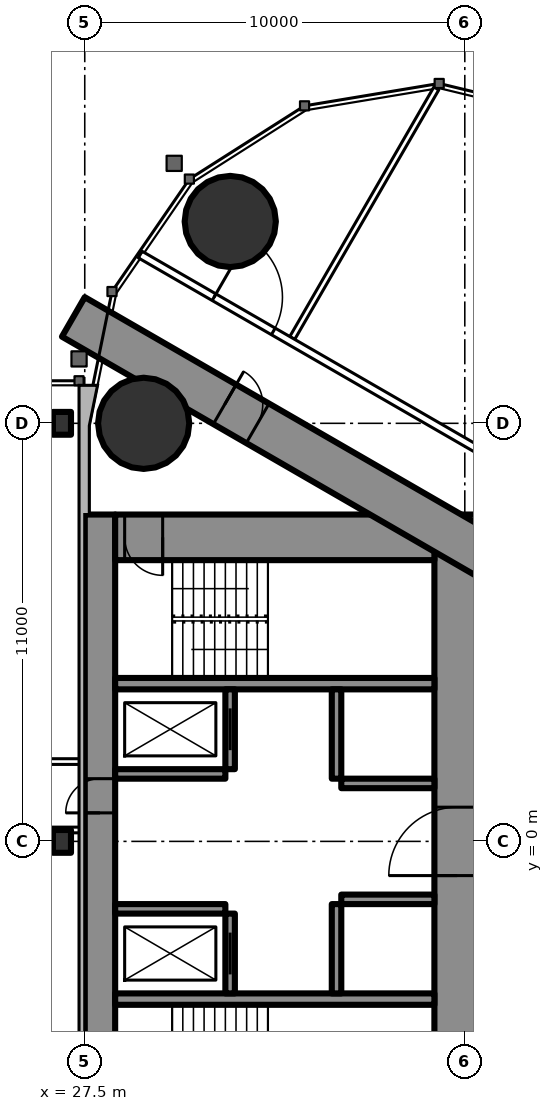
"""IFC4 building model, lengths in metres.
Left out: names, types, materials, properties, quantities, classifications, styles, units other than length and angle.
Written with IfcOpenShell. Run it as: python <this file> out.ifc"""

import sys

from ifc_helpers import new_model, si_unit, direction, frame, frame_2d, origin, origin_2d, place, context, subcontext, project, spatial, rectangle, circle, i_section, extrude, element, fill, save


model = new_model("IFC4")
c1 = context("Model", 3, precision=1e-05, world=origin(), true_north=direction((0.0, 1.0)))
c2 = subcontext(c1, "Body", "Model", "MODEL_VIEW")
j1 = project(units=[si_unit("LENGTHUNIT", "METRE"), si_unit("PLANEANGLEUNIT", "RADIAN")], contexts=[c1])
p1 = place(None, origin())
s1 = spatial("IfcSite", under=j1, at=p1, CompositionType="ELEMENT")
p2 = place(p1, origin())
s2 = spatial("IfcBuilding", under=s1, at=p2, CompositionType="ELEMENT")
p3 = place(p2, frame((0.0, 0.0, 229.7)))
s3 = spatial("IfcBuildingStorey", under=s2, at=p3, CompositionType="ELEMENT", Elevation=229.7)
for number, where, z_axis, x_axis in (
    (1, (31.328, 16.311, 0.0), (0.0, 0.0, 1.0), (1.0, 0.0, 0.0)),
    (2, (29.05, 11.0, 0.0), (0.0, 0.0, 1.0), (1.0, 0.0, 0.0)),
):
    element("IfcColumn", number, at=place(p3, frame(where, z_axis=z_axis, x_axis=x_axis)), inside=s3, PredefinedType="COLUMN", context=c2, shape_type="SweptSolid", body=[
        extrude(circle(Radius=1.2, at=origin_2d()), origin(), (0.0, 0.0, 1.0), 3.6),
    ])
p4 = place(p3, frame((27.9, -8.6, 0.0), z_axis=(0.0, 0.0, 1.0), x_axis=(0.0, 1.0, 0.0)))
e3 = element("IfcWall", 3, at=p4, inside=s3, PredefinedType="SHEAR", context=c2, shape_type="SweptSolid", body=[
    extrude(rectangle(XDim=17.2, YDim=0.8, at=frame_2d((8.6, 0.0))), origin(), (0.0, 0.0, 1.0), 3.6),
])
p5 = place(p4, frame((9.35, 0.0, 0.0)))
e4 = element("IfcOpeningElement", 4, at=p5, cuts=e3, PredefinedType="OPENING", context=c2, shape_type="SweptSolid", body=[
    extrude(rectangle(XDim=0.9, YDim=2.2, at=frame_2d((0.45, 1.1))), frame((0.0, 0.41, 0.0), z_axis=(0.0, -1.0, 0.0), x_axis=(1.0, 0.0, 0.0)), (0.0, 0.0, 1.0), 0.82),
])
p6 = place(p3, frame((37.3, -8.6, 0.0), z_axis=(0.0, 0.0, 1.0), x_axis=(0.0, 1.0, 0.0)))
e5 = element("IfcWall", 5, at=p6, inside=s3, PredefinedType="SHEAR", context=c2, shape_type="SweptSolid", body=[
    extrude(rectangle(XDim=17.2, YDim=1.2, at=frame_2d((8.6, 0.0))), origin(), (0.0, 0.0, 1.0), 3.6),
])
p7 = place(p6, frame((7.7, 0.0, 0.0)))
e6 = element("IfcOpeningElement", 6, at=p7, cuts=e5, PredefinedType="OPENING", context=c2, shape_type="SweptSolid", body=[
    extrude(rectangle(XDim=1.8, YDim=2.2, at=frame_2d((0.9, 1.1))), frame((0.0, 0.61, 0.0), z_axis=(0.0, -1.0, 0.0), x_axis=(1.0, 0.0, 0.0)), (0.0, 0.0, 1.0), 1.22),
])
p8 = place(p3, frame((28.3, 8.0, 0.0), z_axis=(0.0, 0.0, 1.0), x_axis=(1.0, 0.0, 0.0)))
e7 = element("IfcWall", 7, at=p8, inside=s3, PredefinedType="SHEAR", context=c2, shape_type="SweptSolid", body=[
    extrude(rectangle(XDim=8.4, YDim=1.2, at=frame_2d((4.2, 0.0))), origin(), (0.0, 0.0, 1.0), 3.6),
])
p9 = place(p8, frame((0.25, 0.0, 0.0)))
e8 = element("IfcOpeningElement", 8, at=p9, cuts=e7, PredefinedType="OPENING", context=c2, shape_type="SweptSolid", body=[
    extrude(rectangle(XDim=1.0, YDim=2.2, at=frame_2d((0.5, 1.1))), frame((0.0, 0.61, 0.0), z_axis=(0.0, -1.0, 0.0), x_axis=(1.0, 0.0, 0.0)), (0.0, 0.0, 1.0), 1.22),
])
for number, where, z_axis, x_axis in (
    (9, (28.3, -4.15, 0.0), (0.0, 0.0, 1.0), (1.0, 0.0, 0.0)),
    (10, (28.3, 4.15, 0.0), (0.0, 0.0, 1.0), (1.0, 0.0, 0.0)),
):
    element("IfcWall", number, at=place(p3, frame(where, z_axis=z_axis, x_axis=x_axis)), inside=s3, PredefinedType="SHEAR", context=c2, shape_type="SweptSolid", body=[
        extrude(rectangle(XDim=8.4, YDim=0.3, at=frame_2d((4.2, 0.0))), origin(), (0.0, 0.0, 1.0), 3.6),
    ])
p10 = place(p3, frame((31.325, -4.0, 0.0), z_axis=(0.0, 0.0, 1.0), x_axis=(0.0, 1.0, 0.0)))
e11 = element("IfcWall", 11, at=p10, inside=s3, PredefinedType="SHEAR", context=c2, shape_type="SweptSolid", body=[
    extrude(rectangle(XDim=2.1, YDim=0.25, at=frame_2d((1.05, 0.0))), origin(), (0.0, 0.0, 1.0), 3.6),
])
p11 = place(p10, frame((0.5, 0.0, 0.0)))
e12 = element("IfcOpeningElement", 12, at=p11, cuts=e11, PredefinedType="OPENING", context=c2, shape_type="SweptSolid", body=[
    extrude(rectangle(XDim=1.1, YDim=2.2, at=frame_2d((0.55, 1.1))), frame((0.0, 0.135, 0.0), z_axis=(0.0, -1.0, 0.0), x_axis=(1.0, 0.0, 0.0)), (0.0, 0.0, 1.0), 0.27),
])
p12 = place(p3, frame((34.125, -4.0, 0.0), z_axis=(0.0, 0.0, 1.0), x_axis=(0.0, 1.0, 0.0)))
e13 = element("IfcWall", 13, at=p12, inside=s3, PredefinedType="SHEAR", context=c2, shape_type="SweptSolid", body=[
    extrude(rectangle(XDim=2.35, YDim=0.25, at=frame_2d((1.175, 0.0))), origin(), (0.0, 0.0, 1.0), 3.6),
])
p13 = place(p3, frame((28.3, -1.775, 0.0), z_axis=(0.0, 0.0, 1.0), x_axis=(1.0, 0.0, 0.0)))
e14 = element("IfcWall", 14, at=p13, inside=s3, PredefinedType="SHEAR", context=c2, shape_type="SweptSolid", body=[
    extrude(rectangle(XDim=2.9, YDim=0.25, at=frame_2d((1.45, 0.0))), origin(), (0.0, 0.0, 1.0), 3.6),
])
p14 = place(p3, frame((34.25, -1.525, 0.0), z_axis=(0.0, 0.0, 1.0), x_axis=(1.0, 0.0, 0.0)))
e15 = element("IfcWall", 15, at=p14, inside=s3, PredefinedType="SHEAR", context=c2, shape_type="SweptSolid", body=[
    extrude(rectangle(XDim=2.45, YDim=0.25, at=frame_2d((1.225, 0.0))), origin(), (0.0, 0.0, 1.0), 3.6),
])
p15 = place(p3, frame((31.325, 1.9, 0.0), z_axis=(0.0, 0.0, 1.0), x_axis=(0.0, 1.0, 0.0)))
e16 = element("IfcWall", 16, at=p15, inside=s3, PredefinedType="SHEAR", context=c2, shape_type="SweptSolid", body=[
    extrude(rectangle(XDim=2.1, YDim=0.25, at=frame_2d((1.05, 0.0))), origin(), (0.0, 0.0, 1.0), 3.6),
])
p16 = place(p15, frame((0.5, 0.0, 0.0)))
e17 = element("IfcOpeningElement", 17, at=p16, cuts=e16, PredefinedType="OPENING", context=c2, shape_type="SweptSolid", body=[
    extrude(rectangle(XDim=1.1, YDim=2.2, at=frame_2d((0.55, 1.1))), frame((0.0, 0.135, 0.0), z_axis=(0.0, -1.0, 0.0), x_axis=(1.0, 0.0, 0.0)), (0.0, 0.0, 1.0), 0.27),
])
p17 = place(p3, frame((34.125, 1.65, 0.0), z_axis=(0.0, 0.0, 1.0), x_axis=(0.0, 1.0, 0.0)))
e18 = element("IfcWall", 18, at=p17, inside=s3, PredefinedType="SHEAR", context=c2, shape_type="SweptSolid", body=[
    extrude(rectangle(XDim=2.35, YDim=0.25, at=frame_2d((1.175, 0.0))), origin(), (0.0, 0.0, 1.0), 3.6),
])
p18 = place(p3, frame((28.3, 1.775, 0.0), z_axis=(0.0, 0.0, 1.0), x_axis=(1.0, 0.0, 0.0)))
e19 = element("IfcWall", 19, at=p18, inside=s3, PredefinedType="SHEAR", context=c2, shape_type="SweptSolid", body=[
    extrude(rectangle(XDim=2.9, YDim=0.25, at=frame_2d((1.45, 0.0))), origin(), (0.0, 0.0, 1.0), 3.6),
])
p19 = place(p3, frame((34.25, 1.525, 0.0), z_axis=(0.0, 0.0, 1.0), x_axis=(1.0, 0.0, 0.0)))
e20 = element("IfcWall", 20, at=p19, inside=s3, PredefinedType="SHEAR", context=c2, shape_type="SweptSolid", body=[
    extrude(rectangle(XDim=2.45, YDim=0.25, at=frame_2d((1.225, 0.0))), origin(), (0.0, 0.0, 1.0), 3.6),
])
p20 = place(p3, frame((27.2, -13.8, 0.0), z_axis=(0.0, 0.0, 1.0), x_axis=(0.866027159892, 0.499996958321, 0.0)))
e21 = element("IfcWall", 21, at=p20, inside=s3, PredefinedType="SHEAR", context=c2, shape_type="SweptSolid", body=[
    extrude(rectangle(XDim=27.947, YDim=1.2, at=frame_2d((13.973, 0.0))), origin(), (0.0, 0.0, 1.0), 3.6),
])
p21 = place(p20, frame((4.6, 0.0, 0.0)))
e22 = element("IfcOpeningElement", 22, at=p21, cuts=e21, PredefinedType="OPENING", context=c2, shape_type="SweptSolid", body=[
    extrude(rectangle(XDim=1.0, YDim=2.2, at=frame_2d((0.5, 1.1))), frame((0.0, 0.61, 0.0), z_axis=(0.0, -1.0, 0.0), x_axis=(1.0, 0.0, 0.0)), (0.0, 0.0, 1.0), 1.22),
])
p22 = place(p20, frame((13.395, 0.0, 0.0)))
e23 = element("IfcOpeningElement", 23, at=p22, cuts=e21, PredefinedType="OPENING", context=c2, shape_type="SweptSolid", body=[
    extrude(rectangle(XDim=1.8, YDim=2.2, at=frame_2d((0.9, 1.1))), frame((0.0, 0.61, 0.0), z_axis=(0.0, -1.0, 0.0), x_axis=(1.0, 0.0, 0.0)), (0.0, 0.0, 1.0), 1.22),
])
p23 = place(p3, frame((27.2, 13.8, 0.0), z_axis=(0.0, 0.0, 1.0), x_axis=(0.866024515034, -0.500001539357, 0.0)))
e24 = element("IfcWall", 24, at=p23, inside=s3, PredefinedType="SHEAR", context=c2, shape_type="SweptSolid", body=[
    extrude(rectangle(XDim=26.907, YDim=1.2, at=frame_2d((13.454, 0.0))), origin(), (0.0, 0.0, 1.0), 3.6),
])
p24 = place(p23, frame((4.6, 0.0, 0.0)))
e25 = element("IfcOpeningElement", 25, at=p24, cuts=e24, PredefinedType="OPENING", context=c2, shape_type="SweptSolid", body=[
    extrude(rectangle(XDim=1.0, YDim=2.2, at=frame_2d((0.5, 1.1))), frame((0.0, 0.61, 0.0), z_axis=(0.0, -1.0, 0.0), x_axis=(1.0, 0.0, 0.0)), (0.0, 0.0, 1.0), 1.22),
])
p25 = place(p23, frame((13.395, 0.0, 0.0)))
e26 = element("IfcOpeningElement", 26, at=p25, cuts=e24, PredefinedType="OPENING", context=c2, shape_type="SweptSolid", body=[
    extrude(rectangle(XDim=1.8, YDim=2.2, at=frame_2d((0.9, 1.1))), frame((0.0, 0.61, 0.0), z_axis=(0.0, -1.0, 0.0), x_axis=(1.0, 0.0, 0.0)), (0.0, 0.0, 1.0), 1.22),
])
for number, where, z_axis, x_axis in (
    (27, (26.9, 0.0, 0.0), (0.0, 0.0, 1.0), (1.0, 0.0, 0.0)),
    (28, (26.9, 11.0, 0.0), (0.0, 0.0, 1.0), (1.0, 0.0, 0.0)),
):
    element("IfcColumn", number, at=place(p3, frame(where, z_axis=z_axis, x_axis=x_axis)), inside=s3, PredefinedType="COLUMN", context=c2, shape_type="SweptSolid", body=[
        extrude(i_section(OverallWidth=0.476, OverallDepth=0.6, WebThickness=0.1, FlangeThickness=0.14, FilletRadius=0.02, at=origin_2d()), origin(), (0.0, 0.0, 1.0), 3.6),
    ])
p26 = place(p3, frame((32.96, 13.246, 0.0), z_axis=(0.0, 0.0, 1.0), x_axis=(0.500000236886, 0.866025267018, 0.0)))
e29 = element("IfcWall", 29, at=p26, inside=s3, PredefinedType="PARTITIONING", context=c2, shape_type="SweptSolid", body=[
    extrude(rectangle(XDim=7.583, YDim=0.15, at=frame_2d((3.791, 0.0))), origin(), (0.0, 0.0, 1.0), 3.35),
])
p27 = place(p3, frame((28.959, 15.44, 0.0), z_axis=(0.0, 0.0, 1.0), x_axis=(0.866028936079, -0.499993881836, 0.0)))
e30 = element("IfcWall", 30, at=p27, inside=s3, PredefinedType="PARTITIONING", context=c2, shape_type="SweptSolid", body=[
    extrude(rectangle(XDim=20.503, YDim=0.2, at=frame_2d((10.251, 0.0))), origin(), (0.0, 0.0, 1.0), 3.35),
])
p28 = place(p27, frame((16.137, 0.0, 0.0)))
e31 = element("IfcOpeningElement", 31, at=p28, cuts=e30, PredefinedType="OPENING", context=c2, shape_type="SweptSolid", body=[
    extrude(rectangle(XDim=0.95, YDim=2.2, at=frame_2d((0.475, 1.1))), frame((0.0, 0.11, 0.0), z_axis=(0.0, -1.0, 0.0), x_axis=(1.0, 0.0, 0.0)), (0.0, 0.0, 1.0), 0.22),
])
p29 = place(p27, frame((14.437, 0.0, 0.0)))
e32 = element("IfcOpeningElement", 32, at=p29, cuts=e30, PredefinedType="OPENING", context=c2, shape_type="SweptSolid", body=[
    extrude(rectangle(XDim=0.95, YDim=2.2, at=frame_2d((0.475, 1.1))), frame((0.0, 0.11, 0.0), z_axis=(0.0, -1.0, 0.0), x_axis=(1.0, 0.0, 0.0)), (0.0, 0.0, 1.0), 0.22),
])
p30 = place(p27, frame((2.244, 0.0, 0.0)))
e33 = element("IfcOpeningElement", 33, at=p30, cuts=e30, PredefinedType="OPENING", context=c2, shape_type="SweptSolid", body=[
    extrude(rectangle(XDim=1.8, YDim=2.04, at=frame_2d((0.9, 1.02))), frame((0.0, 0.11, 0.0), z_axis=(0.0, -1.0, 0.0), x_axis=(1.0, 0.0, 0.0)), (0.0, 0.0, 1.0), 0.22),
])
p31 = place(p3, frame((-27.5, 0.3, 0.0), z_axis=(0.0, 0.0, 1.0), x_axis=(1.0, 0.0, 0.0)))
e34 = element("IfcWall", 34, at=p31, inside=s3, PredefinedType="PARTITIONING", context=c2, shape_type="SweptSolid", body=[
    extrude(rectangle(XDim=55.0, YDim=0.15, at=frame_2d((27.5, 0.0))), origin(), (0.0, 0.0, 1.0), 2.4),
])
p32 = place(p31, frame((1.575, 0.0, 0.0)))
e35 = element("IfcOpeningElement", 35, at=p32, cuts=e34, PredefinedType="OPENING", context=c2, shape_type="SweptSolid", body=[
    extrude(rectangle(XDim=1.0, YDim=2.2, at=frame_2d((0.5, 1.1))), frame((0.0, 0.085, 0.0), z_axis=(0.0, -1.0, 0.0), x_axis=(1.0, 0.0, 0.0)), (0.0, 0.0, 1.0), 0.17),
])
p33 = place(p31, frame((7.525, 0.0, 0.0)))
e36 = element("IfcOpeningElement", 36, at=p33, cuts=e34, PredefinedType="OPENING", context=c2, shape_type="SweptSolid", body=[
    extrude(rectangle(XDim=1.05, YDim=2.4, at=frame_2d((0.525, 1.2))), frame((0.0, 0.085, 0.0), z_axis=(0.0, -1.0, 0.0), x_axis=(1.0, 0.0, 0.0)), (0.0, 0.0, 1.0), 0.17),
])
p34 = place(p31, frame((18.525, 0.0, 0.0)))
e37 = element("IfcOpeningElement", 37, at=p34, cuts=e34, PredefinedType="OPENING", context=c2, shape_type="SweptSolid", body=[
    extrude(rectangle(XDim=1.05, YDim=2.4, at=frame_2d((0.525, 1.2))), frame((0.0, 0.085, 0.0), z_axis=(0.0, -1.0, 0.0), x_axis=(1.0, 0.0, 0.0)), (0.0, 0.0, 1.0), 0.17),
])
p35 = place(p31, frame((24.025, 0.0, 0.0)))
e38 = element("IfcOpeningElement", 38, at=p35, cuts=e34, PredefinedType="OPENING", context=c2, shape_type="SweptSolid", body=[
    extrude(rectangle(XDim=1.05, YDim=2.4, at=frame_2d((0.525, 1.2))), frame((0.0, 0.085, 0.0), z_axis=(0.0, -1.0, 0.0), x_axis=(1.0, 0.0, 0.0)), (0.0, 0.0, 1.0), 0.17),
])
p36 = place(p31, frame((35.025, 0.0, 0.0)))
e39 = element("IfcOpeningElement", 39, at=p36, cuts=e34, PredefinedType="OPENING", context=c2, shape_type="SweptSolid", body=[
    extrude(rectangle(XDim=1.05, YDim=2.4, at=frame_2d((0.525, 1.2))), frame((0.0, 0.085, 0.0), z_axis=(0.0, -1.0, 0.0), x_axis=(1.0, 0.0, 0.0)), (0.0, 0.0, 1.0), 0.17),
])
p37 = place(p31, frame((40.525, 0.0, 0.0)))
e40 = element("IfcOpeningElement", 40, at=p37, cuts=e34, PredefinedType="OPENING", context=c2, shape_type="SweptSolid", body=[
    extrude(rectangle(XDim=1.05, YDim=2.4, at=frame_2d((0.525, 1.2))), frame((0.0, 0.085, 0.0), z_axis=(0.0, -1.0, 0.0), x_axis=(1.0, 0.0, 0.0)), (0.0, 0.0, 1.0), 0.17),
])
p38 = place(p31, frame((52.525, 0.0, 0.0)))
e41 = element("IfcOpeningElement", 41, at=p38, cuts=e34, PredefinedType="OPENING", context=c2, shape_type="SweptSolid", body=[
    extrude(rectangle(XDim=1.05, YDim=2.4, at=frame_2d((0.525, 1.2))), frame((0.0, 0.085, 0.0), z_axis=(0.0, -1.0, 0.0), x_axis=(1.0, 0.0, 0.0)), (0.0, 0.0, 1.0), 0.17),
])
p39 = place(p3, frame((5.85, 2.1, 0.0), z_axis=(0.0, 0.0, 1.0), x_axis=(1.0, 0.0, 0.0)))
e42 = element("IfcWall", 42, at=p39, inside=s3, PredefinedType="PARTITIONING", context=c2, shape_type="SweptSolid", body=[
    extrude(rectangle(XDim=21.65, YDim=0.15, at=frame_2d((10.825, 0.0))), origin(), (0.0, 0.0, 1.0), 3.4),
])
p40 = place(p39, frame((1.675, 0.0, 0.0)))
e43 = element("IfcOpeningElement", 43, at=p40, cuts=e42, PredefinedType="OPENING", context=c2, shape_type="SweptSolid", body=[
    extrude(rectangle(XDim=1.05, YDim=2.4, at=frame_2d((0.525, 1.2))), frame((0.0, 0.085, 0.0), z_axis=(0.0, -1.0, 0.0), x_axis=(1.0, 0.0, 0.0)), (0.0, 0.0, 1.0), 0.17),
])
p41 = place(p39, frame((7.175, 0.0, 0.0)))
e44 = element("IfcOpeningElement", 44, at=p41, cuts=e42, PredefinedType="OPENING", context=c2, shape_type="SweptSolid", body=[
    extrude(rectangle(XDim=1.05, YDim=2.4, at=frame_2d((0.525, 1.2))), frame((0.0, 0.085, 0.0), z_axis=(0.0, -1.0, 0.0), x_axis=(1.0, 0.0, 0.0)), (0.0, 0.0, 1.0), 0.17),
])
p42 = place(p39, frame((19.175, 0.0, 0.0)))
e45 = element("IfcOpeningElement", 45, at=p42, cuts=e42, PredefinedType="OPENING", context=c2, shape_type="SweptSolid", body=[
    extrude(rectangle(XDim=1.05, YDim=2.4, at=frame_2d((0.525, 1.2))), frame((0.0, 0.085, 0.0), z_axis=(0.0, -1.0, 0.0), x_axis=(1.0, 0.0, 0.0)), (0.0, 0.0, 1.0), 0.17),
])
p43 = place(p30, origin())
e46 = element("IfcDoor", 46, at=p43, inside=s3, OperationType="DOUBLE_DOOR_SINGLE_SWING", PredefinedType="DOOR", context=c2, shape_type="SweptSolid", body=[
    extrude(rectangle(XDim=1.8, YDim=2.04, at=frame_2d((0.9, 1.02))), frame((0.0, 0.025, 0.0), z_axis=(0.0, -1.0, 0.0), x_axis=(1.0, 0.0, 0.0)), (0.0, 0.0, 1.0), 0.05),
])
fill(e33, e46)
p44 = place(p24, origin())
e47 = element("IfcDoor", 47, at=p44, inside=s3, OperationType="SINGLE_SWING_LEFT", PredefinedType="DOOR", context=c2, shape_type="SweptSolid", body=[
    extrude(rectangle(XDim=1.0, YDim=2.2, at=frame_2d((0.5, 1.1))), frame((0.0, 0.025, 0.0), z_axis=(0.0, -1.0, 0.0), x_axis=(1.0, 0.0, 0.0)), (0.0, 0.0, 1.0), 0.05),
])
fill(e25, e47)
p45 = place(p7, origin())
e48 = element("IfcDoor", 48, at=p45, inside=s3, OperationType="DOUBLE_DOOR_SINGLE_SWING", PredefinedType="DOOR", context=c2, shape_type="SweptSolid", body=[
    extrude(rectangle(XDim=1.8, YDim=2.2, at=frame_2d((0.9, 1.1))), frame((0.0, 0.025, 0.0), z_axis=(0.0, -1.0, 0.0), x_axis=(1.0, 0.0, 0.0)), (0.0, 0.0, 1.0), 0.05),
])
fill(e6, e48)
p46 = place(p9, origin())
e49 = element("IfcDoor", 49, at=p46, inside=s3, OperationType="SINGLE_SWING_RIGHT", PredefinedType="DOOR", context=c2, shape_type="SweptSolid", body=[
    extrude(rectangle(XDim=1.0, YDim=2.2, at=frame_2d((0.5, 1.1))), frame((0.0, 0.025, 0.0), z_axis=(0.0, -1.0, 0.0), x_axis=(1.0, 0.0, 0.0)), (0.0, 0.0, 1.0), 0.05),
])
fill(e8, e49)
p47 = place(p5, origin())
e50 = element("IfcDoor", 50, at=p47, inside=s3, OperationType="SINGLE_SWING_LEFT", PredefinedType="DOOR", context=c2, shape_type="SweptSolid", body=[
    extrude(rectangle(XDim=0.9, YDim=2.2, at=frame_2d((0.45, 1.1))), frame((0.0, 0.025, 0.0), z_axis=(0.0, -1.0, 0.0), x_axis=(1.0, 0.0, 0.0)), (0.0, 0.0, 1.0), 0.05),
])
fill(e4, e50)
p48 = place(p11, origin())
e51 = element("IfcDoor", 51, at=p48, inside=s3, OperationType="SLIDING_TO_LEFT", PredefinedType="USERDEFINED", context=c2, shape_type="SweptSolid", body=[
    extrude(rectangle(XDim=1.1, YDim=2.2, at=frame_2d((0.55, 1.1))), frame((0.0, 0.025, 0.0), z_axis=(0.0, -1.0, 0.0), x_axis=(1.0, 0.0, 0.0)), (0.0, 0.0, 1.0), 0.05),
])
fill(e12, e51)
p49 = place(p16, origin())
e52 = element("IfcDoor", 52, at=p49, inside=s3, OperationType="SLIDING_TO_LEFT", PredefinedType="USERDEFINED", context=c2, shape_type="SweptSolid", body=[
    extrude(rectangle(XDim=1.1, YDim=2.2, at=frame_2d((0.55, 1.1))), frame((0.0, 0.025, 0.0), z_axis=(0.0, -1.0, 0.0), x_axis=(1.0, 0.0, 0.0)), (0.0, 0.0, 1.0), 0.05),
])
fill(e17, e52)
save(model, sys.argv[1])
